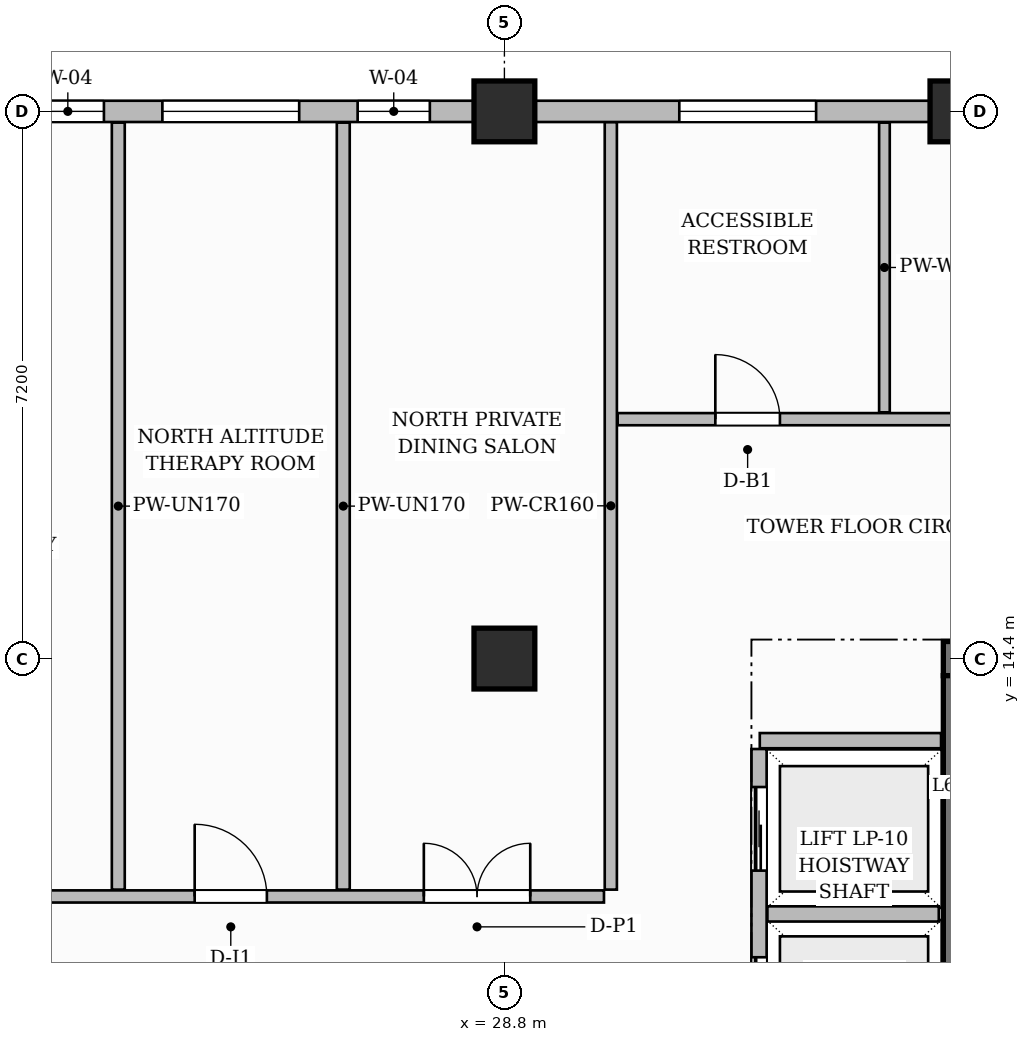
"""IFC4 building model, lengths in metres.
Left out: names, types, materials, properties, quantities, classifications, styles, units other than length and angle.
Written with IfcOpenShell. Run it as: python <this file> out.ifc"""

import sys

from ifc_helpers import new_model, si_unit, direction, frame, frame_2d, origin, origin_2d, place, context, subcontext, project, spatial, rectangle, extrude, source, transform, mapped, element, fill, save


model = new_model("IFC4")
c1 = context("Model", 3, precision=1e-05, world=origin(), true_north=direction((0.0, 1.0)))
c2 = subcontext(c1, "Body", "Model", "MODEL_VIEW")
j1 = project(units=[si_unit("LENGTHUNIT", "METRE"), si_unit("PLANEANGLEUNIT", "RADIAN")], contexts=[c1])
p1 = place(None, origin())
s1 = spatial("IfcSite", under=j1, at=p1, CompositionType="ELEMENT")
p2 = place(p1, origin())
s2 = spatial("IfcBuilding", under=s1, at=p2, CompositionType="ELEMENT")
p3 = place(p2, frame((0.0, 0.0, 267.35)))
s3 = spatial("IfcBuildingStorey", under=s2, at=p3, CompositionType="ELEMENT", Elevation=267.35)
p4 = place(p3, frame((34.575, 14.4, 0.0), z_axis=(0.0, 0.0, 1.0), x_axis=(1.0, 0.0, 0.0)))
e1 = element("IfcWall", 1, at=p4, inside=s3, PredefinedType="SHEAR", context=c2, shape_type="SweptSolid", body=[
    extrude(rectangle(XDim=15.45, YDim=0.45, at=frame_2d((7.725, 0.0))), origin(), (0.0, 0.0, 1.0), 3.85),
])
p5 = place(p4, frame((5.355, 0.0, 0.0)))
e2 = element("IfcOpeningElement", 2, at=p5, cuts=e1, PredefinedType="OPENING", context=c2, shape_type="SweptSolid", body=[
    extrude(rectangle(XDim=1.5, YDim=2.2, at=frame_2d((0.75, 1.1))), frame((0.0, 0.235, 0.0), z_axis=(0.0, -1.0, 0.0), x_axis=(1.0, 0.0, 0.0)), (0.0, 0.0, 1.0), 0.47),
])
p6 = place(p4, frame((1.57, 0.0, 0.0)))
e3 = element("IfcOpeningElement", 3, at=p6, cuts=e1, PredefinedType="OPENING", context=c2, shape_type="SweptSolid", body=[
    extrude(rectangle(XDim=1.05, YDim=2.15, at=frame_2d((0.525, 1.075))), frame((0.0, 0.235, 0.0), z_axis=(0.0, -1.0, 0.0), x_axis=(1.0, 0.0, 0.0)), (0.0, 0.0, 1.0), 0.47),
])
p7 = place(p4, frame((11.2, 0.0, 0.0)))
e4 = element("IfcOpeningElement", 4, at=p7, cuts=e1, PredefinedType="OPENING", context=c2, shape_type="SweptSolid", body=[
    extrude(rectangle(XDim=1.05, YDim=2.15, at=frame_2d((0.525, 1.075))), frame((0.0, 0.235, 0.0), z_axis=(0.0, -1.0, 0.0), x_axis=(1.0, 0.0, 0.0)), (0.0, 0.0, 1.0), 0.47),
])
p8 = place(p3, frame((34.8, 3.825, 0.0), z_axis=(0.0, 0.0, 1.0), x_axis=(0.0, 1.0, 0.0)))
e5 = element("IfcWall", 5, at=p8, inside=s3, PredefinedType="SHEAR", context=c2, shape_type="SweptSolid", body=[
    extrude(rectangle(XDim=10.35, YDim=0.45, at=frame_2d((5.175, 0.0))), origin(), (0.0, 0.0, 1.0), 3.85),
])
m1 = source(origin(), c2, "Body", "SweptSolid", [
    extrude(rectangle(XDim=0.8, YDim=0.8, at=origin_2d()), origin(), (0.0, 0.0, 1.0), 3.85),
])
for number, where, z_axis, x_axis in (
    (6, (28.8, 14.4, 0.0), (0.0, 0.0, 1.0), (1.0, 0.0, 0.0)),
    (7, (28.8, 21.6, 0.0), (0.0, 0.0, 1.0), (1.0, 0.0, 0.0)),
    (8, (34.8, 21.6, 0.0), (0.0, 0.0, 1.0), (1.0, 0.0, 0.0)),
):
    element("IfcColumn", number, at=place(p3, frame(where, z_axis=z_axis, x_axis=x_axis)), inside=s3, PredefinedType="COLUMN", context=c2, shape_type="MappedRepresentation", body=[
        mapped(m1, transform((0.0, 0.0, 0.0), scale=1.0)),
    ])
p9 = place(p3, frame((32.16, 13.32, 0.0), z_axis=(0.0, 0.0, 1.0), x_axis=(1.0, 0.0, 0.0)))
e9 = element("IfcWall", 9, at=p9, inside=s3, PredefinedType="PARTITIONING", context=c2, shape_type="SweptSolid", body=[
    extrude(rectangle(XDim=2.385, YDim=0.2, at=frame_2d((1.192, 0.0))), origin(), (0.0, 0.0, 1.0), 3.6),
])
p10 = place(p3, frame((32.15, 4.39, 0.0), z_axis=(0.0, 0.0, 1.0), x_axis=(0.0, 1.0, 0.0)))
e10 = element("IfcWall", 10, at=p10, inside=s3, PredefinedType="PARTITIONING", context=c2, shape_type="SweptSolid", body=[
    extrude(rectangle(XDim=8.82, YDim=0.2, at=frame_2d((4.41, 0.0))), origin(), (0.0, 0.0, 1.0), 3.6),
])
p11 = place(p10, frame((0.5, 0.0, 0.0)))
e11 = element("IfcOpeningElement", 11, at=p11, cuts=e10, PredefinedType="OPENING", context=c2, shape_type="SweptSolid", body=[
    extrude(rectangle(XDim=1.1, YDim=2.2, at=frame_2d((0.55, 1.1))), frame((0.0, 0.11, 0.0), z_axis=(0.0, -1.0, 0.0), x_axis=(1.0, 0.0, 0.0)), (0.0, 0.0, 1.0), 0.22),
])
p12 = place(p10, frame((2.74, 0.0, 0.0)))
e12 = element("IfcOpeningElement", 12, at=p12, cuts=e10, PredefinedType="OPENING", context=c2, shape_type="SweptSolid", body=[
    extrude(rectangle(XDim=1.1, YDim=2.2, at=frame_2d((0.55, 1.1))), frame((0.0, 0.11, 0.0), z_axis=(0.0, -1.0, 0.0), x_axis=(1.0, 0.0, 0.0)), (0.0, 0.0, 1.0), 0.22),
])
p13 = place(p10, frame((4.98, 0.0, 0.0)))
e13 = element("IfcOpeningElement", 13, at=p13, cuts=e10, PredefinedType="OPENING", context=c2, shape_type="SweptSolid", body=[
    extrude(rectangle(XDim=1.1, YDim=2.2, at=frame_2d((0.55, 1.1))), frame((0.0, 0.11, 0.0), z_axis=(0.0, -1.0, 0.0), x_axis=(1.0, 0.0, 0.0)), (0.0, 0.0, 1.0), 0.22),
])
p14 = place(p10, frame((7.22, 0.0, 0.0)))
e14 = element("IfcOpeningElement", 14, at=p14, cuts=e10, PredefinedType="OPENING", context=c2, shape_type="SweptSolid", body=[
    extrude(rectangle(XDim=1.1, YDim=2.2, at=frame_2d((0.55, 1.1))), frame((0.0, 0.11, 0.0), z_axis=(0.0, -1.0, 0.0), x_axis=(1.0, 0.0, 0.0)), (0.0, 0.0, 1.0), 0.22),
])
p15 = place(p3, frame((32.26, 11.04, 0.0), z_axis=(0.0, 0.0, 1.0), x_axis=(1.0, 0.0, 0.0)))
e15 = element("IfcWall", 15, at=p15, inside=s3, PredefinedType="PARTITIONING", context=c2, shape_type="SweptSolid", body=[
    extrude(rectangle(XDim=2.255, YDim=0.2, at=frame_2d((1.127, 0.0))), origin(), (0.0, 0.0, 1.0), 3.6),
])
p16 = place(p3, frame((18.148, 11.27, 0.0), z_axis=(0.0, 0.0, 1.0), x_axis=(1.0, 0.0, 0.0)))
e16 = element("IfcWall", 16, at=p16, inside=s3, PredefinedType="PARTITIONING", context=c2, shape_type="SweptSolid", body=[
    extrude(rectangle(XDim=11.962, YDim=0.16, at=frame_2d((5.981, 0.0))), origin(), (0.0, 0.0, 1.0), 3.6),
])
p17 = place(p16, frame((2.237, 0.0, 0.0)))
e17 = element("IfcOpeningElement", 17, at=p17, cuts=e16, PredefinedType="OPENING", context=c2, shape_type="SweptSolid", body=[
    extrude(rectangle(XDim=0.95, YDim=2.15, at=frame_2d((0.475, 1.075))), frame((0.0, 0.09, 0.0), z_axis=(0.0, -1.0, 0.0), x_axis=(1.0, 0.0, 0.0)), (0.0, 0.0, 1.0), 0.18),
])
p18 = place(p16, frame((6.577, 0.0, 0.0)))
e18 = element("IfcOpeningElement", 18, at=p18, cuts=e16, PredefinedType="OPENING", context=c2, shape_type="SweptSolid", body=[
    extrude(rectangle(XDim=0.95, YDim=2.15, at=frame_2d((0.475, 1.075))), frame((0.0, 0.09, 0.0), z_axis=(0.0, -1.0, 0.0), x_axis=(1.0, 0.0, 0.0)), (0.0, 0.0, 1.0), 0.18),
])
p19 = place(p16, frame((9.592, 0.0, 0.0)))
e19 = element("IfcOpeningElement", 19, at=p19, cuts=e16, PredefinedType="OPENING", context=c2, shape_type="SweptSolid", body=[
    extrude(rectangle(XDim=1.4, YDim=2.35, at=frame_2d((0.7, 1.175))), frame((0.0, 0.09, 0.0), z_axis=(0.0, -1.0, 0.0), x_axis=(1.0, 0.0, 0.0)), (0.0, 0.0, 1.0), 0.18),
])
p20 = place(p3, frame((30.2, 11.36, 0.0), z_axis=(0.0, 0.0, 1.0), x_axis=(0.0, 1.0, 0.0)))
e20 = element("IfcWall", 20, at=p20, inside=s3, PredefinedType="PARTITIONING", context=c2, shape_type="SweptSolid", body=[
    extrude(rectangle(XDim=10.1, YDim=0.16, at=frame_2d((5.05, 0.0))), origin(), (0.0, 0.0, 1.0), 3.6),
])
p21 = place(p3, frame((30.29, 17.55, 0.0), z_axis=(0.0, 0.0, 1.0), x_axis=(1.0, 0.0, 0.0)))
e21 = element("IfcWall", 21, at=p21, inside=s3, PredefinedType="PARTITIONING", context=c2, shape_type="SweptSolid", body=[
    extrude(rectangle(XDim=19.37, YDim=0.16, at=frame_2d((9.685, 0.0))), origin(), (0.0, 0.0, 1.0), 3.6),
])
p22 = place(p21, frame((1.285, 0.0, 0.0)))
e22 = element("IfcOpeningElement", 22, at=p22, cuts=e21, PredefinedType="OPENING", context=c2, shape_type="SweptSolid", body=[
    extrude(rectangle(XDim=0.85, YDim=2.1, at=frame_2d((0.425, 1.05))), frame((0.0, 0.09, 0.0), z_axis=(0.0, -1.0, 0.0), x_axis=(1.0, 0.0, 0.0)), (0.0, 0.0, 1.0), 0.18),
])
p23 = place(p21, frame((10.66, 0.0, 0.0)))
e23 = element("IfcOpeningElement", 23, at=p23, cuts=e21, PredefinedType="OPENING", context=c2, shape_type="SweptSolid", body=[
    extrude(rectangle(XDim=1.6, YDim=2.4, at=frame_2d((0.8, 1.2))), frame((0.0, 0.09, 0.0), z_axis=(0.0, -1.0, 0.0), x_axis=(1.0, 0.0, 0.0)), (0.0, 0.0, 1.0), 0.18),
])
p24 = place(p3, frame((33.8, 17.64, 0.0), z_axis=(0.0, 0.0, 1.0), x_axis=(0.0, 1.0, 0.0)))
e24 = element("IfcWall", 24, at=p24, inside=s3, PredefinedType="PARTITIONING", context=c2, shape_type="SweptSolid", body=[
    extrude(rectangle(XDim=3.812, YDim=0.14, at=frame_2d((1.906, 0.0))), origin(), (0.0, 0.0, 1.0), 3.6),
])
for number, where, z_axis, x_axis in (
    (25, (23.72, 11.36, 0.0), (0.0, 0.0, 1.0), (0.0, 1.0, 0.0)),
    (26, (26.68, 11.36, 0.0), (0.0, 0.0, 1.0), (0.0, 1.0, 0.0)),
):
    element("IfcWall", number, at=place(p3, frame(where, z_axis=z_axis, x_axis=x_axis)), inside=s3, PredefinedType="PARTITIONING", context=c2, shape_type="SweptSolid", body=[
        extrude(rectangle(XDim=10.092, YDim=0.17, at=frame_2d((5.046, 0.0))), origin(), (0.0, 0.0, 1.0), 3.6),
    ])
p25 = place(p3, frame((18.0, 21.6, 0.0), z_axis=(0.0, 0.0, 1.0), x_axis=(1.0, 0.0, 0.0)))
e27 = element("IfcWall", 27, at=p25, inside=s3, PredefinedType="SOLIDWALL", context=c2, shape_type="SweptSolid", body=[
    extrude(rectangle(XDim=31.8, YDim=0.28, at=frame_2d((15.9, 0.0))), origin(), (0.0, 0.0, 1.0), 3.185),
])
p26 = place(p25, frame((0.42, 0.0, 0.0)))
e28 = element("IfcOpeningElement", 28, at=p26, cuts=e27, PredefinedType="OPENING", context=c2, shape_type="SweptSolid", body=[
    extrude(rectangle(XDim=1.2, YDim=2.2, at=frame_2d((0.6, 1.1))), frame((0.0, 0.15, 0.0), z_axis=(0.0, -1.0, 0.0), x_axis=(1.0, 0.0, 0.0)), (0.0, 0.0, 1.0), 0.3),
])
p27 = place(p25, frame((4.581, 0.0, 0.8)))
e29 = element("IfcOpeningElement", 29, at=p27, cuts=e27, PredefinedType="OPENING", context=c2, shape_type="SweptSolid", body=[
    extrude(rectangle(XDim=0.95, YDim=1.75, at=frame_2d((0.475, 0.875))), frame((0.0, 0.15, 0.0), z_axis=(0.0, -1.0, 0.0), x_axis=(1.0, 0.0, 0.0)), (0.0, 0.0, 1.0), 0.3),
])
p28 = place(p25, frame((6.3, 0.0, 0.8)))
e30 = element("IfcOpeningElement", 30, at=p28, cuts=e27, PredefinedType="OPENING", context=c2, shape_type="SweptSolid", body=[
    extrude(rectangle(XDim=1.8, YDim=1.85, at=frame_2d((0.9, 0.925))), frame((0.0, 0.15, 0.0), z_axis=(0.0, -1.0, 0.0), x_axis=(1.0, 0.0, 0.0)), (0.0, 0.0, 1.0), 0.3),
])
p29 = place(p25, frame((8.869, 0.0, 0.8)))
e31 = element("IfcOpeningElement", 31, at=p29, cuts=e27, PredefinedType="OPENING", context=c2, shape_type="SweptSolid", body=[
    extrude(rectangle(XDim=0.95, YDim=1.75, at=frame_2d((0.475, 0.875))), frame((0.0, 0.15, 0.0), z_axis=(0.0, -1.0, 0.0), x_axis=(1.0, 0.0, 0.0)), (0.0, 0.0, 1.0), 0.3),
])
p30 = place(p25, frame((13.101, 0.0, 0.8)))
e32 = element("IfcOpeningElement", 32, at=p30, cuts=e27, PredefinedType="OPENING", context=c2, shape_type="SweptSolid", body=[
    extrude(rectangle(XDim=1.8, YDim=1.85, at=frame_2d((0.9, 0.925))), frame((0.0, 0.15, 0.0), z_axis=(0.0, -1.0, 0.0), x_axis=(1.0, 0.0, 0.0)), (0.0, 0.0, 1.0), 0.3),
])
p31 = place(p25, frame((18.125, 0.0, 0.8)))
e33 = element("IfcOpeningElement", 33, at=p31, cuts=e27, PredefinedType="OPENING", context=c2, shape_type="SweptSolid", body=[
    extrude(rectangle(XDim=1.8, YDim=1.85, at=frame_2d((0.9, 0.925))), frame((0.0, 0.15, 0.0), z_axis=(0.0, -1.0, 0.0), x_axis=(1.0, 0.0, 0.0)), (0.0, 0.0, 1.0), 0.3),
])
p32 = place(p25, frame((20.875, 0.0, 0.8)))
e34 = element("IfcOpeningElement", 34, at=p32, cuts=e27, PredefinedType="OPENING", context=c2, shape_type="SweptSolid", body=[
    extrude(rectangle(XDim=1.8, YDim=1.85, at=frame_2d((0.9, 0.925))), frame((0.0, 0.15, 0.0), z_axis=(0.0, -1.0, 0.0), x_axis=(1.0, 0.0, 0.0)), (0.0, 0.0, 1.0), 0.3),
])
p33 = place(p25, frame((25.475, 0.0, 0.8)))
e35 = element("IfcOpeningElement", 35, at=p33, cuts=e27, PredefinedType="OPENING", context=c2, shape_type="SweptSolid", body=[
    extrude(rectangle(XDim=1.8, YDim=1.85, at=frame_2d((0.9, 0.925))), frame((0.0, 0.15, 0.0), z_axis=(0.0, -1.0, 0.0), x_axis=(1.0, 0.0, 0.0)), (0.0, 0.0, 1.0), 0.3),
])
p34 = place(p25, frame((28.525, 0.0, 0.8)))
e36 = element("IfcOpeningElement", 36, at=p34, cuts=e27, PredefinedType="OPENING", context=c2, shape_type="SweptSolid", body=[
    extrude(rectangle(XDim=1.8, YDim=1.85, at=frame_2d((0.9, 0.925))), frame((0.0, 0.15, 0.0), z_axis=(0.0, -1.0, 0.0), x_axis=(1.0, 0.0, 0.0)), (0.0, 0.0, 1.0), 0.3),
])
m2 = source(origin(), c2, "Body", "SweptSolid", [
    extrude(rectangle(XDim=0.85, YDim=2.1, at=frame_2d((0.425, 1.05))), frame((0.0, 0.025, 0.0), z_axis=(0.0, -1.0, 0.0), x_axis=(1.0, 0.0, 0.0)), (0.0, 0.0, 1.0), 0.05),
])
p35 = place(p22, origin())
e37 = element("IfcDoor", 37, at=p35, inside=s3, OperationType="SINGLE_SWING_LEFT", PredefinedType="DOOR", context=c2, shape_type="MappedRepresentation", body=[
    mapped(m2, transform((0.0, 0.0, 0.0), scale=1.0)),
])
fill(e22, e37)
m3 = source(origin(), c2, "Body", "SweptSolid", [
    extrude(rectangle(XDim=0.95, YDim=2.15, at=frame_2d((0.475, 1.075))), frame((0.0, 0.025, 0.0), z_axis=(0.0, -1.0, 0.0), x_axis=(1.0, 0.0, 0.0)), (0.0, 0.0, 1.0), 0.05),
])
p36 = place(p18, origin())
e38 = element("IfcDoor", 38, at=p36, inside=s3, OperationType="SINGLE_SWING_LEFT", PredefinedType="DOOR", context=c2, shape_type="MappedRepresentation", body=[
    mapped(m3, transform((0.0, 0.0, 0.0), scale=1.0)),
])
fill(e18, e38)
m4 = source(origin(), c2, "Body", "SweptSolid", [
    extrude(rectangle(XDim=1.4, YDim=2.35, at=frame_2d((0.7, 1.175))), frame((0.0, 0.025, 0.0), z_axis=(0.0, -1.0, 0.0), x_axis=(1.0, 0.0, 0.0)), (0.0, 0.0, 1.0), 0.05),
])
p37 = place(p19, origin())
e39 = element("IfcDoor", 39, at=p37, inside=s3, OperationType="DOUBLE_DOOR_SINGLE_SWING", PredefinedType="DOOR", context=c2, shape_type="MappedRepresentation", body=[
    mapped(m4, transform((0.0, 0.0, 0.0), scale=1.0)),
])
fill(e19, e39)
m5 = source(origin(), c2, "Body", "SweptSolid", [
    extrude(rectangle(XDim=1.1, YDim=2.2, at=frame_2d((0.55, 1.1))), frame((0.0, 0.025, 0.0), z_axis=(0.0, -1.0, 0.0), x_axis=(1.0, 0.0, 0.0)), (0.0, 0.0, 1.0), 0.05),
])
p38 = place(p13, origin())
e40 = element("IfcDoor", 40, at=p38, inside=s3, OperationType="SLIDING_TO_LEFT", PredefinedType="DOOR", context=c2, shape_type="MappedRepresentation", body=[
    mapped(m5, transform((0.0, 0.0, 0.0), scale=1.0)),
])
fill(e13, e40)
p39 = place(p14, origin())
e41 = element("IfcDoor", 41, at=p39, inside=s3, OperationType="SLIDING_TO_LEFT", PredefinedType="DOOR", context=c2, shape_type="MappedRepresentation", body=[
    mapped(m5, transform((0.0, 0.0, 0.0), scale=1.0)),
])
fill(e14, e41)
m6 = source(origin(), c2, "Body", "SweptSolid", [
    extrude(rectangle(XDim=0.95, YDim=1.75, at=frame_2d((0.475, 0.875))), frame((0.0, 0.03, 0.0), z_axis=(0.0, -1.0, 0.0), x_axis=(1.0, 0.0, 0.0)), (0.0, 0.0, 1.0), 0.06),
])
p40 = place(p27, origin())
e42 = element("IfcWindow", 42, at=p40, inside=s3, PartitioningType="SINGLE_PANEL", PredefinedType="WINDOW", context=c2, shape_type="MappedRepresentation", body=[
    mapped(m6, transform((0.0, 0.0, 0.0), scale=1.0)),
])
fill(e29, e42)
m7 = source(origin(), c2, "Body", "SweptSolid", [
    extrude(rectangle(XDim=1.8, YDim=1.85, at=frame_2d((0.9, 0.925))), frame((0.0, 0.03, 0.0), z_axis=(0.0, -1.0, 0.0), x_axis=(1.0, 0.0, 0.0)), (0.0, 0.0, 1.0), 0.06),
])
p41 = place(p28, origin())
e43 = element("IfcWindow", 43, at=p41, inside=s3, PartitioningType="DOUBLE_PANEL_VERTICAL", PredefinedType="WINDOW", context=c2, shape_type="MappedRepresentation", body=[
    mapped(m7, transform((0.0, 0.0, 0.0), scale=1.0)),
])
fill(e30, e43)
p42 = place(p29, origin())
e44 = element("IfcWindow", 44, at=p42, inside=s3, PartitioningType="SINGLE_PANEL", PredefinedType="WINDOW", context=c2, shape_type="MappedRepresentation", body=[
    mapped(m6, transform((0.0, 0.0, 0.0), scale=1.0)),
])
fill(e31, e44)
p43 = place(p30, origin())
e45 = element("IfcWindow", 45, at=p43, inside=s3, PartitioningType="DOUBLE_PANEL_VERTICAL", PredefinedType="WINDOW", context=c2, shape_type="MappedRepresentation", body=[
    mapped(m7, transform((0.0, 0.0, 0.0), scale=1.0)),
])
fill(e32, e45)
save(model, sys.argv[1])
